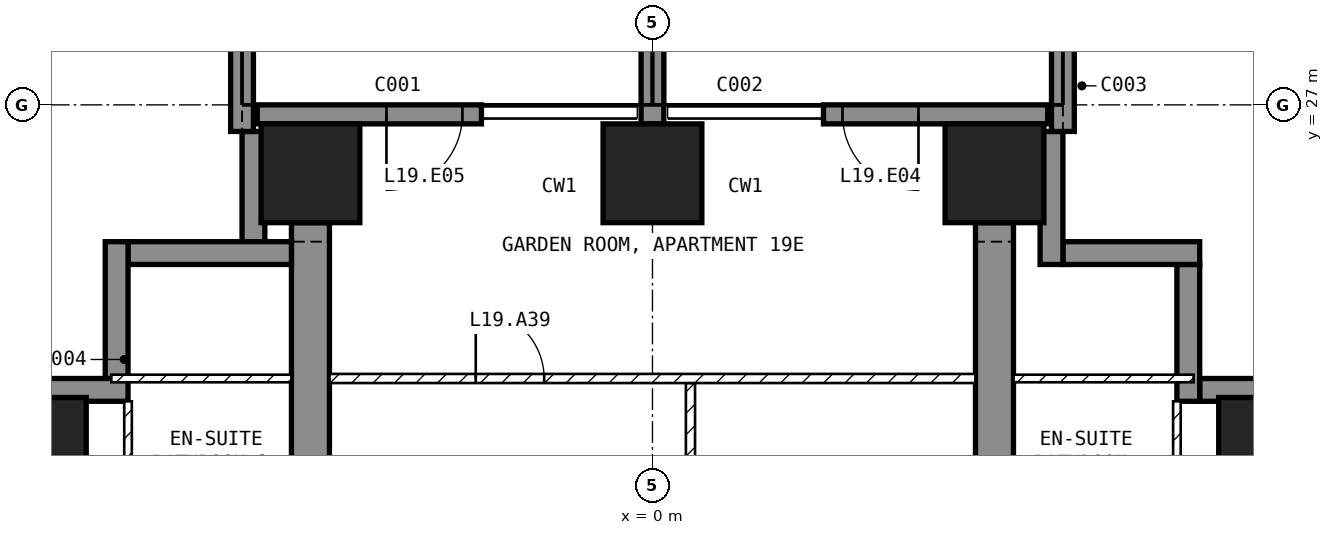
"""IFC4 building model, lengths in metres.
Left out: names, types, materials, properties, quantities, classifications, styles, units other than length and angle.
Written with IfcOpenShell. Run it as: python <this file> out.ifc"""

import sys

from ifc_helpers import new_model, si_unit, direction, frame, frame_2d, origin, origin_2d, place, context, subcontext, project, spatial, polyline, rectangle, outline, extrude, element, fill, save


model = new_model("IFC4")
c1 = context("Model", 3, precision=1e-05, world=origin(), true_north=direction((0.0, 1.0)))
c2 = subcontext(c1, "Body", "Model", "MODEL_VIEW")
j1 = project(units=[si_unit("LENGTHUNIT", "METRE"), si_unit("PLANEANGLEUNIT", "RADIAN")], contexts=[c1])
p1 = place(None, origin())
s1 = spatial("IfcSite", under=j1, at=p1, CompositionType="ELEMENT")
p2 = place(p1, origin())
s2 = spatial("IfcBuilding", under=s1, at=p2, CompositionType="ELEMENT")
p3 = place(p2, frame((0.0, 0.0, 85.5)))
s3 = spatial("IfcBuildingStorey", under=s2, at=p3, CompositionType="ELEMENT", Elevation=85.5)
for number, where, z_axis, x_axis in (
    (1, (-8.1, 22.5, -0.25), (0.0, 0.0, 1.0), (1.0, 0.0, 0.0)),
    (2, (-4.5, 26.1, -0.25), (0.0, 0.0, 1.0), (1.0, 0.0, 0.0)),
    (3, (0.0, 26.1, -0.25), (0.0, 0.0, 1.0), (1.0, 0.0, 0.0)),
    (4, (4.5, 26.1, -0.25), (0.0, 0.0, 1.0), (1.0, 0.0, 0.0)),
    (5, (8.1, 22.5, -0.25), (0.0, 0.0, 1.0), (1.0, 0.0, 0.0)),
):
    element("IfcColumn", number, at=place(p3, frame(where, z_axis=z_axis, x_axis=x_axis)), inside=s3, PredefinedType="COLUMN", context=c2, shape_type="SweptSolid", body=[
        extrude(rectangle(XDim=1.3, YDim=1.3, at=origin_2d()), origin(), (0.0, 0.0, 1.0), 3.5),
    ])
for number, where, z_axis, x_axis in (
    (6, (-4.75, 9.0, -0.25), (1.0, 0.0, 0.0), (0.0, 1.0, 0.0)),
    (7, (4.25, 9.0, -0.25), (1.0, 0.0, 0.0), (0.0, 1.0, 0.0)),
):
    element("IfcWall", number, at=place(p3, frame(where, z_axis=z_axis, x_axis=x_axis)), inside=s3, PredefinedType="SHEAR", context=c2, shape_type="SweptSolid", body=[
        extrude(outline(polyline([(0.0, 0.0), (2.1, 0.0), (2.1, 2.65), (4.5, 2.65), (4.5, 0.0), (9.9, 0.0), (9.9, 2.65), (12.3, 2.65), (12.3, 0.0), (16.45, 0.0), (16.45, 3.5), (0.0, 3.5), (0.0, 0.0)])), origin(), (0.0, 0.0, 1.0), 0.5),
    ])
p4 = place(p3, frame((5.2, 26.875, 0.0), z_axis=(0.0, 0.0, 1.0), x_axis=(-1.0, 0.0, 0.0)))
e8 = element("IfcWall", 8, at=p4, inside=s3, PredefinedType="SOLIDWALL", context=c2, shape_type="SweptSolid", body=[
    extrude(rectangle(XDim=2.95, YDim=0.25, at=frame_2d((1.475, 0.0))), origin(), (0.0, 0.0, 1.0), 3.25),
])
p5 = place(p4, frame((1.7, 0.0, 0.0)))
e9 = element("IfcOpeningElement", 9, at=p5, cuts=e8, PredefinedType="OPENING", context=c2, shape_type="SweptSolid", body=[
    extrude(rectangle(XDim=1.0, YDim=2.4, at=frame_2d((0.5, 1.2))), frame((0.0, 0.135, 0.0), z_axis=(0.0, -1.0, 0.0), x_axis=(1.0, 0.0, 0.0)), (0.0, 0.0, 1.0), 0.27),
])
p6 = place(p3, frame((-2.25, 26.875, 0.0), z_axis=(0.0, 0.0, 1.0), x_axis=(-1.0, 0.0, 0.0)))
e10 = element("IfcWall", 10, at=p6, inside=s3, PredefinedType="SOLIDWALL", context=c2, shape_type="SweptSolid", body=[
    extrude(rectangle(XDim=2.95, YDim=0.25, at=frame_2d((1.475, 0.0))), origin(), (0.0, 0.0, 1.0), 3.25),
])
p7 = place(p6, frame((0.25, 0.0, 0.0)))
e11 = element("IfcOpeningElement", 11, at=p7, cuts=e10, PredefinedType="OPENING", context=c2, shape_type="SweptSolid", body=[
    extrude(rectangle(XDim=1.0, YDim=2.4, at=frame_2d((0.5, 1.2))), frame((0.0, 0.135, 0.0), z_axis=(0.0, -1.0, 0.0), x_axis=(1.0, 0.0, 0.0)), (0.0, 0.0, 1.0), 0.27),
])
p8 = place(p3, frame((8.65, 23.25, 0.0), z_axis=(0.0, 0.0, 1.0), x_axis=(-1.0, 0.0, 0.0)))
e12 = element("IfcWall", 12, at=p8, inside=s3, PredefinedType="SOLIDWALL", context=c2, shape_type="SweptSolid", body=[
    extrude(rectangle(XDim=1.45, YDim=0.3, at=frame_2d((0.725, 0.0))), origin(), (0.0, 0.0, 1.0), 3.25),
])
p9 = place(p3, frame((7.05, 23.1, 0.0), z_axis=(0.0, 0.0, 1.0), x_axis=(0.0, 1.0, 0.0)))
e13 = element("IfcWall", 13, at=p9, inside=s3, PredefinedType="SOLIDWALL", context=c2, shape_type="SweptSolid", body=[
    extrude(rectangle(XDim=1.8, YDim=0.3, at=frame_2d((0.9, 0.0))), origin(), (0.0, 0.0, 1.0), 3.25),
])
p10 = place(p3, frame((7.2, 25.05, 0.0), z_axis=(0.0, 0.0, 1.0), x_axis=(-1.0, 0.0, 0.0)))
e14 = element("IfcWall", 14, at=p10, inside=s3, PredefinedType="SOLIDWALL", context=c2, shape_type="SweptSolid", body=[
    extrude(rectangle(XDim=1.8, YDim=0.3, at=frame_2d((0.9, 0.0))), origin(), (0.0, 0.0, 1.0), 3.25),
])
p11 = place(p3, frame((5.25, 24.9, 0.0), z_axis=(0.0, 0.0, 1.0), x_axis=(0.0, 1.0, 0.0)))
e15 = element("IfcWall", 15, at=p11, inside=s3, PredefinedType="SOLIDWALL", context=c2, shape_type="SweptSolid", body=[
    extrude(rectangle(XDim=1.75, YDim=0.3, at=frame_2d((0.875, 0.0))), origin(), (0.0, 0.0, 1.0), 3.25),
])
p12 = place(p3, frame((-5.25, 26.65, 0.0), z_axis=(0.0, 0.0, 1.0), x_axis=(0.0, -1.0, 0.0)))
e16 = element("IfcWall", 16, at=p12, inside=s3, PredefinedType="SOLIDWALL", context=c2, shape_type="SweptSolid", body=[
    extrude(rectangle(XDim=1.45, YDim=0.3, at=frame_2d((0.725, 0.0))), origin(), (0.0, 0.0, 1.0), 3.25),
])
p13 = place(p3, frame((-4.75, 25.05, 0.0), z_axis=(0.0, 0.0, 1.0), x_axis=(-1.0, 0.0, 0.0)))
e17 = element("IfcWall", 17, at=p13, inside=s3, PredefinedType="SOLIDWALL", context=c2, shape_type="SweptSolid", body=[
    extrude(rectangle(XDim=2.15, YDim=0.3, at=frame_2d((1.075, 0.0))), origin(), (0.0, 0.0, 1.0), 3.25),
])
p14 = place(p3, frame((-7.05, 25.2, 0.0), z_axis=(0.0, 0.0, 1.0), x_axis=(0.0, -1.0, 0.0)))
e18 = element("IfcWall", 18, at=p14, inside=s3, PredefinedType="SOLIDWALL", context=c2, shape_type="SweptSolid", body=[
    extrude(rectangle(XDim=1.8, YDim=0.3, at=frame_2d((0.9, 0.0))), origin(), (0.0, 0.0, 1.0), 3.25),
])
p15 = place(p3, frame((-6.9, 23.25, 0.0), z_axis=(0.0, 0.0, 1.0), x_axis=(-1.0, 0.0, 0.0)))
e19 = element("IfcWall", 19, at=p15, inside=s3, PredefinedType="SOLIDWALL", context=c2, shape_type="SweptSolid", body=[
    extrude(rectangle(XDim=1.75, YDim=0.3, at=frame_2d((0.875, 0.0))), origin(), (0.0, 0.0, 1.0), 3.25),
])
p16 = place(p3, frame((-5.4, 26.65, 0.0), z_axis=(0.0, 0.0, 1.0), x_axis=(0.0, 1.0, 0.0)))
e20 = element("IfcWall", 20, at=p16, inside=s3, PredefinedType="SOLIDWALL", context=c2, shape_type="SweptSolid", body=[
    extrude(rectangle(XDim=3.05, YDim=0.3, at=frame_2d((1.525, 0.0))), origin(), (0.0, 0.0, 1.0), 3.25),
])
p17 = place(p3, frame((0.0, 26.75, 0.0), z_axis=(0.0, 0.0, 1.0), x_axis=(0.0, 1.0, 0.0)))
e21 = element("IfcWall", 21, at=p17, inside=s3, PredefinedType="SOLIDWALL", context=c2, shape_type="SweptSolid", body=[
    extrude(rectangle(XDim=2.95, YDim=0.3, at=frame_2d((1.475, 0.0))), origin(), (0.0, 0.0, 1.0), 3.25),
])
p18 = place(p3, frame((5.4, 26.65, 0.0), z_axis=(0.0, 0.0, 1.0), x_axis=(0.0, 1.0, 0.0)))
e22 = element("IfcWall", 22, at=p18, inside=s3, PredefinedType="SOLIDWALL", context=c2, shape_type="SweptSolid", body=[
    extrude(rectangle(XDim=3.05, YDim=0.3, at=frame_2d((1.525, 0.0))), origin(), (0.0, 0.0, 1.0), 3.25),
])
p19 = place(p3, frame((0.5, 23.34, 0.0), z_axis=(0.0, 0.0, 1.0), x_axis=(0.0, -1.0, 0.0)))
e23 = element("IfcWall", 23, at=p19, inside=s3, PredefinedType="PARTITIONING", context=c2, shape_type="SweptSolid", body=[
    extrude(rectangle(XDim=4.38, YDim=0.12, at=frame_2d((2.19, 0.0))), origin(), (0.0, 0.0, 1.0), 3.25),
])
p20 = place(p19, frame((1.74, 0.0, 0.0)))
e24 = element("IfcOpeningElement", 24, at=p20, cuts=e23, PredefinedType="OPENING", context=c2, shape_type="SweptSolid", body=[
    extrude(rectangle(XDim=0.9, YDim=2.1, at=frame_2d((0.45, 1.05))), frame((0.0, 0.07, 0.0), z_axis=(0.0, -1.0, 0.0), x_axis=(1.0, 0.0, 0.0)), (0.0, 0.0, 1.0), 0.14),
])
p21 = place(p3, frame((-4.25, 23.4, 0.0), z_axis=(0.0, 0.0, 1.0), x_axis=(1.0, 0.0, 0.0)))
e25 = element("IfcWall", 25, at=p21, inside=s3, PredefinedType="PARTITIONING", context=c2, shape_type="SweptSolid", body=[
    extrude(rectangle(XDim=8.5, YDim=0.12, at=frame_2d((4.25, 0.0))), origin(), (0.0, 0.0, 1.0), 3.25),
])
p22 = place(p21, frame((1.925, 0.0, 0.0)))
e26 = element("IfcOpeningElement", 26, at=p22, cuts=e25, PredefinedType="OPENING", context=c2, shape_type="SweptSolid", body=[
    extrude(rectangle(XDim=0.9, YDim=2.1, at=frame_2d((0.45, 1.05))), frame((0.0, 0.07, 0.0), z_axis=(0.0, -1.0, 0.0), x_axis=(1.0, 0.0, 0.0)), (0.0, 0.0, 1.0), 0.14),
])
p23 = place(p3, frame((6.9, 20.45, 0.0), z_axis=(0.0, 0.0, 1.0), x_axis=(0.0, 1.0, 0.0)))
e27 = element("IfcWall", 27, at=p23, inside=s3, PredefinedType="PARTITIONING", context=c2, shape_type="SweptSolid", body=[
    extrude(rectangle(XDim=2.65, YDim=0.1, at=frame_2d((1.325, 0.0))), origin(), (0.0, 0.0, 1.0), 3.25),
])
p24 = place(p3, frame((4.75, 23.4, 0.0), z_axis=(0.0, 0.0, 1.0), x_axis=(1.0, 0.0, 0.0)))
e28 = element("IfcWall", 28, at=p24, inside=s3, PredefinedType="PARTITIONING", context=c2, shape_type="SweptSolid", body=[
    extrude(rectangle(XDim=2.37, YDim=0.1, at=frame_2d((1.185, 0.0))), origin(), (0.0, 0.0, 1.0), 3.25),
])
p25 = place(p3, frame((-6.9, 23.1, 0.0), z_axis=(0.0, 0.0, 1.0), x_axis=(0.0, -1.0, 0.0)))
e29 = element("IfcWall", 29, at=p25, inside=s3, PredefinedType="PARTITIONING", context=c2, shape_type="SweptSolid", body=[
    extrude(rectangle(XDim=2.65, YDim=0.1, at=frame_2d((1.325, 0.0))), origin(), (0.0, 0.0, 1.0), 3.25),
])
p26 = place(p3, frame((-7.12, 23.4, 0.0), z_axis=(0.0, 0.0, 1.0), x_axis=(1.0, 0.0, 0.0)))
e30 = element("IfcWall", 30, at=p26, inside=s3, PredefinedType="PARTITIONING", context=c2, shape_type="SweptSolid", body=[
    extrude(rectangle(XDim=2.37, YDim=0.1, at=frame_2d((1.185, 0.0))), origin(), (0.0, 0.0, 1.0), 3.25),
])
p27 = place(p5, origin())
e31 = element("IfcDoor", 31, at=p27, inside=s3, OperationType="SINGLE_SWING_LEFT", PredefinedType="DOOR", context=c2, shape_type="SweptSolid", body=[
    extrude(rectangle(XDim=1.0, YDim=2.4, at=frame_2d((0.5, 1.2))), frame((0.0, 0.025, 0.0), z_axis=(0.0, -1.0, 0.0), x_axis=(1.0, 0.0, 0.0)), (0.0, 0.0, 1.0), 0.05),
])
fill(e9, e31)
p28 = place(p7, origin())
e32 = element("IfcDoor", 32, at=p28, inside=s3, OperationType="SINGLE_SWING_RIGHT", PredefinedType="DOOR", context=c2, shape_type="SweptSolid", body=[
    extrude(rectangle(XDim=1.0, YDim=2.4, at=frame_2d((0.5, 1.2))), frame((0.0, 0.025, 0.0), z_axis=(0.0, -1.0, 0.0), x_axis=(1.0, 0.0, 0.0)), (0.0, 0.0, 1.0), 0.05),
])
fill(e11, e32)
p29 = place(p22, origin())
e33 = element("IfcDoor", 33, at=p29, inside=s3, OperationType="SINGLE_SWING_LEFT", PredefinedType="DOOR", context=c2, shape_type="SweptSolid", body=[
    extrude(rectangle(XDim=0.9, YDim=2.1, at=frame_2d((0.45, 1.05))), frame((0.0, 0.025, 0.0), z_axis=(0.0, -1.0, 0.0), x_axis=(1.0, 0.0, 0.0)), (0.0, 0.0, 1.0), 0.05),
])
fill(e26, e33)
save(model, sys.argv[1])
